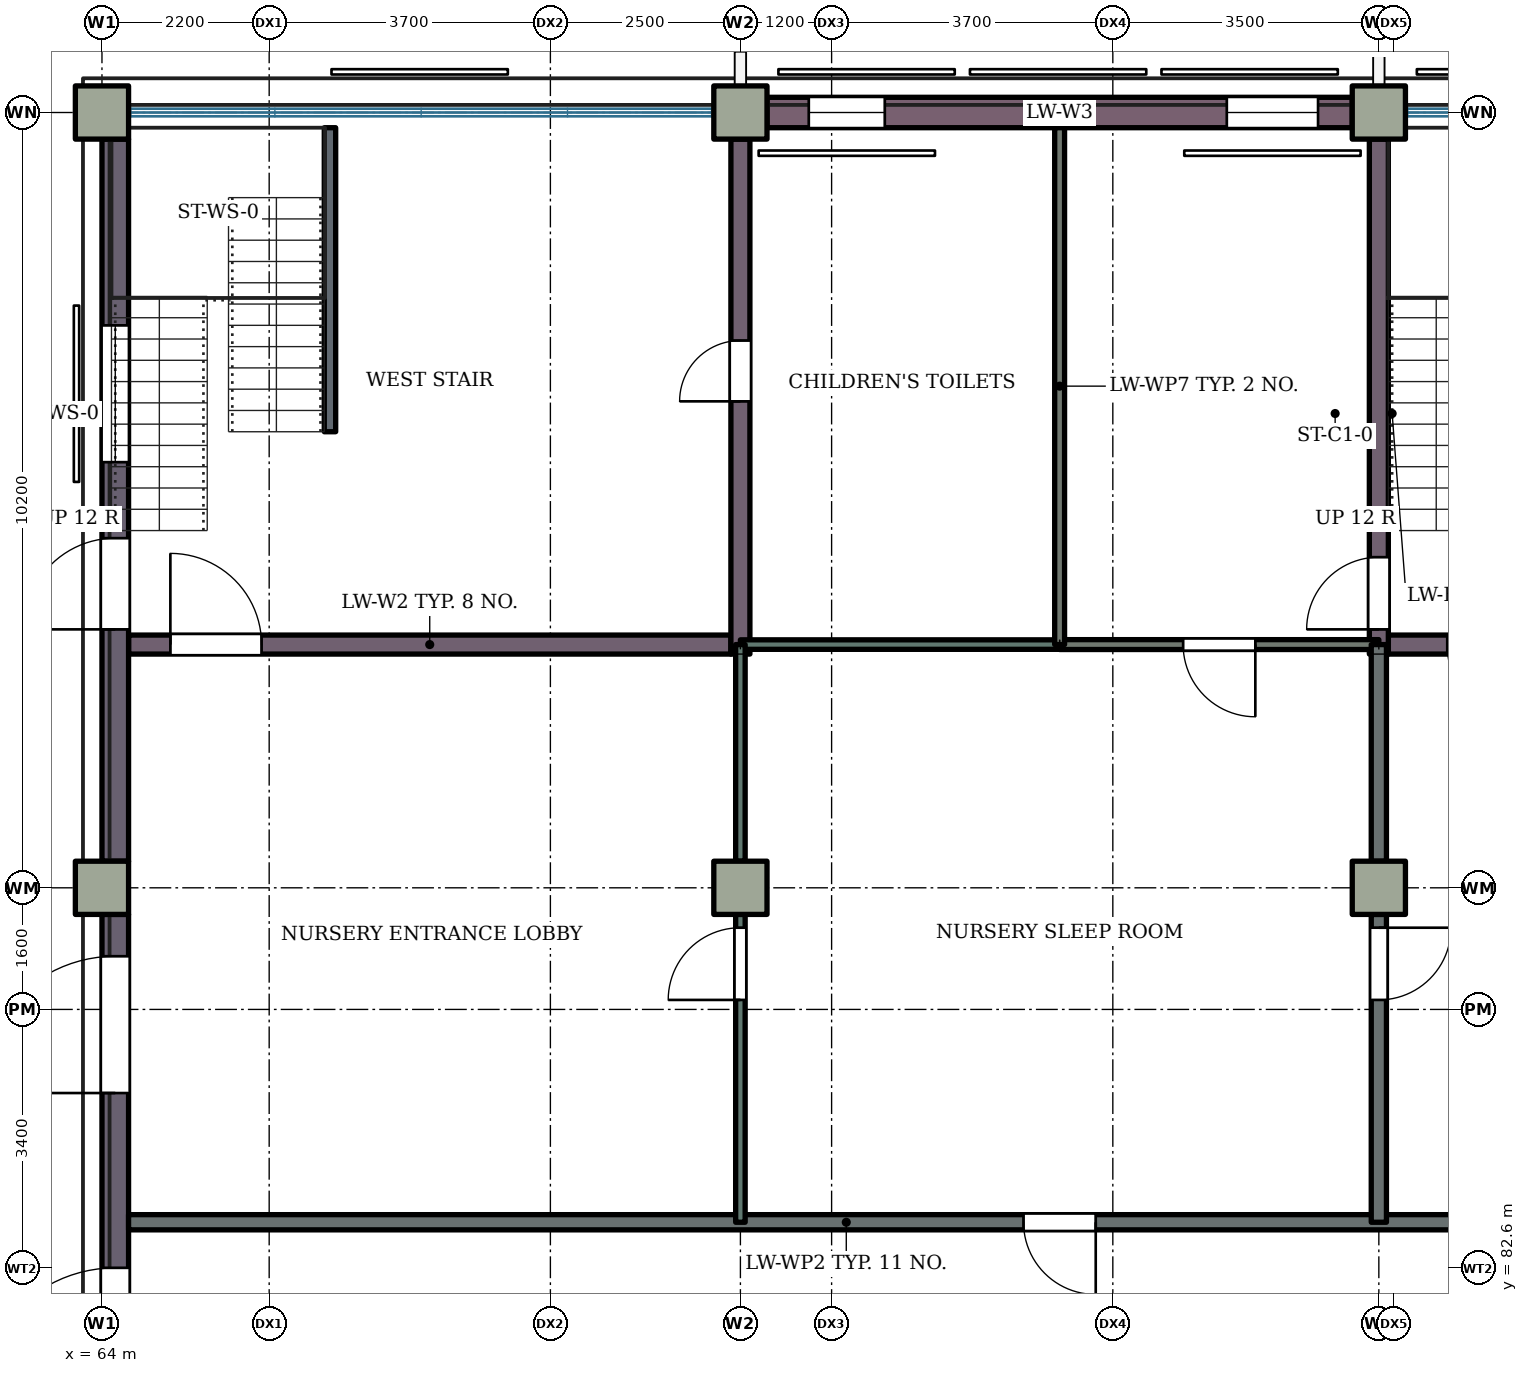
"""IFC4 building model, lengths in metres.
Left out: names, types, materials, properties, quantities, classifications, styles, units other than length and angle.
Written with IfcOpenShell. Run it as: python <this file> out.ifc"""

import sys

from ifc_helpers import new_model, si_unit, direction, frame, frame_2d, origin, origin_2d, place, context, subcontext, project, spatial, rectangle, extrude, element, fill, save


model = new_model("IFC4")
c1 = context("Model", 3, precision=1e-05, world=origin(), true_north=direction((0.0, 1.0)))
c2 = subcontext(c1, "Body", "Model", "MODEL_VIEW")
j1 = project(units=[si_unit("LENGTHUNIT", "METRE"), si_unit("PLANEANGLEUNIT", "RADIAN")], contexts=[c1])
p1 = place(None, origin())
s1 = spatial("IfcSite", under=j1, at=p1, CompositionType="ELEMENT")
p2 = place(p1, origin())
s2 = spatial("IfcBuilding", under=s1, at=p2, CompositionType="ELEMENT")
p3 = place(p2, origin())
s3 = spatial("IfcBuildingStorey", under=s2, at=p3, CompositionType="ELEMENT", Elevation=0.0)
for number, where, z_axis, x_axis in (
    (1, (64.0, 87.6, 0.0), (0.0, 0.0, 1.0), (1.0, 0.0, 0.0)),
    (2, (72.4, 87.6, 0.0), (0.0, 0.0, 1.0), (1.0, 0.0, 0.0)),
    (3, (80.8, 87.6, 0.0), (0.0, 0.0, 1.0), (1.0, 0.0, 0.0)),
    (4, (64.0, 97.8, 0.0), (0.0, 0.0, 1.0), (1.0, 0.0, 0.0)),
    (5, (72.4, 97.8, 0.0), (0.0, 0.0, 1.0), (1.0, 0.0, 0.0)),
    (6, (80.8, 97.8, 0.0), (0.0, 0.0, 1.0), (1.0, 0.0, 0.0)),
):
    element("IfcColumn", number, at=place(p3, frame(where, z_axis=z_axis, x_axis=x_axis)), inside=s3, PredefinedType="COLUMN", context=c2, shape_type="SweptSolid", body=[
        extrude(rectangle(XDim=0.7, YDim=0.7, at=origin_2d()), origin(), (0.0, 0.0, 1.0), 4.2),
    ])
p4 = place(p3, frame((64.35, 90.8, 0.0), z_axis=(0.0, 0.0, 1.0), x_axis=(1.0, 0.0, 0.0)))
e7 = element("IfcWall", 7, at=p4, inside=s3, PredefinedType="SHEAR", context=c2, shape_type="SweptSolid", body=[
    extrude(rectangle(XDim=7.925, YDim=0.25, at=frame_2d((3.962, 0.0))), origin(), (0.0, 0.0, 1.0), 4.2),
])
p5 = place(p4, frame((0.55, 0.0, 0.0)))
e8 = element("IfcOpeningElement", 8, at=p5, cuts=e7, PredefinedType="OPENING", context=c2, shape_type="SweptSolid", body=[
    extrude(rectangle(XDim=1.2, YDim=2.1, at=frame_2d((0.6, 1.05))), frame((0.0, 0.135, 0.0), z_axis=(0.0, -1.0, 0.0), x_axis=(1.0, 0.0, 0.0)), (0.0, 0.0, 1.0), 0.27),
])
p6 = place(p3, frame((80.925, 90.8, 0.0), z_axis=(0.0, 0.0, 1.0), x_axis=(1.0, 0.0, 0.0)))
e9 = element("IfcWall", 9, at=p6, inside=s3, PredefinedType="SHEAR", context=c2, shape_type="SweptSolid", body=[
    extrude(rectangle(XDim=5.45, YDim=0.25, at=frame_2d((2.725, 0.0))), origin(), (0.0, 0.0, 1.0), 4.2),
])
p7 = place(p6, frame((0.775, 0.0, 0.0)))
e10 = element("IfcOpeningElement", 10, at=p7, cuts=e9, PredefinedType="OPENING", context=c2, shape_type="SweptSolid", body=[
    extrude(rectangle(XDim=1.2, YDim=2.1, at=frame_2d((0.6, 1.05))), frame((0.0, 0.135, 0.0), z_axis=(0.0, -1.0, 0.0), x_axis=(1.0, 0.0, 0.0)), (0.0, 0.0, 1.0), 0.27),
])
p8 = place(p3, frame((64.175, 78.75, 0.0), z_axis=(0.0, 0.0, 1.0), x_axis=(0.0, 1.0, 0.0)))
e11 = element("IfcWall", 11, at=p8, inside=s3, PredefinedType="SHEAR", context=c2, shape_type="SweptSolid", body=[
    extrude(rectangle(XDim=8.5, YDim=0.35, at=frame_2d((4.25, 0.0))), origin(), (0.0, 0.0, 1.0), 4.2),
])
p9 = place(p8, frame((2.05, 0.0, 0.0)))
e12 = element("IfcOpeningElement", 12, at=p9, cuts=e11, PredefinedType="OPENING", context=c2, shape_type="SweptSolid", body=[
    extrude(rectangle(XDim=1.8, YDim=2.1, at=frame_2d((0.9, 1.05))), frame((0.0, 0.185, 0.0), z_axis=(0.0, -1.0, 0.0), x_axis=(1.0, 0.0, 0.0)), (0.0, 0.0, 1.0), 0.37),
])
p10 = place(p8, frame((6.15, 0.0, 0.0)))
e13 = element("IfcOpeningElement", 13, at=p10, cuts=e11, PredefinedType="OPENING", context=c2, shape_type="SweptSolid", body=[
    extrude(rectangle(XDim=1.8, YDim=2.1, at=frame_2d((0.9, 1.05))), frame((0.0, 0.185, 0.0), z_axis=(0.0, -1.0, 0.0), x_axis=(1.0, 0.0, 0.0)), (0.0, 0.0, 1.0), 0.37),
])
p11 = place(p3, frame((64.175, 87.95, 0.0), z_axis=(0.0, 0.0, 1.0), x_axis=(0.0, 1.0, 0.0)))
e14 = element("IfcWall", 14, at=p11, inside=s3, PredefinedType="SHEAR", context=c2, shape_type="SweptSolid", body=[
    extrude(rectangle(XDim=9.5, YDim=0.35, at=frame_2d((4.75, 0.0))), origin(), (0.0, 0.0, 1.0), 4.2),
])
p12 = place(p11, frame((3.05, 0.0, 0.0)))
e15 = element("IfcOpeningElement", 15, at=p12, cuts=e14, PredefinedType="OPENING", context=c2, shape_type="SweptSolid", body=[
    extrude(rectangle(XDim=1.2, YDim=2.1, at=frame_2d((0.6, 1.05))), frame((0.0, 0.185, 0.0), z_axis=(0.0, -1.0, 0.0), x_axis=(1.0, 0.0, 0.0)), (0.0, 0.0, 1.0), 0.37),
])
p13 = place(p11, frame((5.25, 0.0, 0.9)))
e16 = element("IfcOpeningElement", 16, at=p13, cuts=e14, PredefinedType="OPENING", context=c2, shape_type="SweptSolid", body=[
    extrude(rectangle(XDim=1.8, YDim=2.1, at=frame_2d((0.9, 1.05))), frame((0.0, 0.185, 0.0), z_axis=(0.0, -1.0, 0.0), x_axis=(1.0, 0.0, 0.0)), (0.0, 0.0, 1.0), 0.37),
])
p14 = place(p3, frame((72.4, 90.675, 0.0), z_axis=(0.0, 0.0, 1.0), x_axis=(0.0, 1.0, 0.0)))
e17 = element("IfcWall", 17, at=p14, inside=s3, PredefinedType="SHEAR", context=c2, shape_type="SweptSolid", body=[
    extrude(rectangle(XDim=6.775, YDim=0.25, at=frame_2d((3.387, 0.0))), origin(), (0.0, 0.0, 1.0), 4.2),
])
p15 = place(p14, frame((3.325, 0.0, 0.0)))
e18 = element("IfcOpeningElement", 18, at=p15, cuts=e17, PredefinedType="OPENING", context=c2, shape_type="SweptSolid", body=[
    extrude(rectangle(XDim=0.8, YDim=2.1, at=frame_2d((0.4, 1.05))), frame((0.0, 0.135, 0.0), z_axis=(0.0, -1.0, 0.0), x_axis=(1.0, 0.0, 0.0)), (0.0, 0.0, 1.0), 0.27),
])
p16 = place(p3, frame((80.8, 90.675, 0.0), z_axis=(0.0, 0.0, 1.0), x_axis=(0.0, 1.0, 0.0)))
e19 = element("IfcWall", 19, at=p16, inside=s3, PredefinedType="SHEAR", context=c2, shape_type="SweptSolid", body=[
    extrude(rectangle(XDim=6.775, YDim=0.25, at=frame_2d((3.387, 0.0))), origin(), (0.0, 0.0, 1.0), 4.2),
])
p17 = place(p16, frame((0.325, 0.0, 0.0)))
e20 = element("IfcOpeningElement", 20, at=p17, cuts=e19, PredefinedType="OPENING", context=c2, shape_type="SweptSolid", body=[
    extrude(rectangle(XDim=0.95, YDim=2.1, at=frame_2d((0.475, 1.05))), frame((0.0, 0.135, 0.0), z_axis=(0.0, -1.0, 0.0), x_axis=(1.0, 0.0, 0.0)), (0.0, 0.0, 1.0), 0.27),
])
p18 = place(p3, frame((72.75, 97.8, 0.0), z_axis=(0.0, 0.0, 1.0), x_axis=(1.0, 0.0, 0.0)))
e21 = element("IfcWall", 21, at=p18, inside=s3, PredefinedType="SOLIDWALL", context=c2, shape_type="SweptSolid", body=[
    extrude(rectangle(XDim=7.7, YDim=0.4, at=frame_2d((3.85, 0.0))), origin(), (0.0, 0.0, 1.0), 3.32),
])
p19 = place(p18, frame((0.55, 0.0, 1.8)))
e22 = element("IfcOpeningElement", 22, at=p19, cuts=e21, PredefinedType="OPENING", context=c2, shape_type="SweptSolid", body=[
    extrude(rectangle(XDim=1.0, YDim=1.2, at=frame_2d((0.5, 0.6))), frame((0.0, 0.21, 0.0), z_axis=(0.0, -1.0, 0.0), x_axis=(1.0, 0.0, 0.0)), (0.0, 0.0, 1.0), 0.42),
])
p20 = place(p18, frame((6.05, 0.0, 1.5)))
e23 = element("IfcOpeningElement", 23, at=p20, cuts=e21, PredefinedType="OPENING", context=c2, shape_type="SweptSolid", body=[
    extrude(rectangle(XDim=1.2, YDim=1.5, at=frame_2d((0.6, 0.75))), frame((0.0, 0.21, 0.0), z_axis=(0.0, -1.0, 0.0), x_axis=(1.0, 0.0, 0.0)), (0.0, 0.0, 1.0), 0.42),
])
p21 = place(p3, frame((64.35, 83.2, 0.0), z_axis=(0.0, 0.0, 1.0), x_axis=(1.0, 0.0, 0.0)))
e24 = element("IfcWall", 24, at=p21, inside=s3, PredefinedType="PARTITIONING", context=c2, shape_type="SweptSolid", body=[
    extrude(rectangle(XDim=24.85, YDim=0.2, at=frame_2d((12.425, 0.0))), origin(), (0.0, 0.0, 1.0), 3.92),
])
p22 = place(p21, frame((11.775, 0.0, 0.0)))
e25 = element("IfcOpeningElement", 25, at=p22, cuts=e24, PredefinedType="OPENING", context=c2, shape_type="SweptSolid", body=[
    extrude(rectangle(XDim=0.95, YDim=2.1, at=frame_2d((0.475, 1.05))), frame((0.0, 0.11, 0.0), z_axis=(0.0, -1.0, 0.0), x_axis=(1.0, 0.0, 0.0)), (0.0, 0.0, 1.0), 0.22),
])
p23 = place(p21, frame((19.75, 0.0, 0.0)))
e26 = element("IfcOpeningElement", 26, at=p23, cuts=e24, PredefinedType="OPENING", context=c2, shape_type="SweptSolid", body=[
    extrude(rectangle(XDim=1.8, YDim=2.1, at=frame_2d((0.9, 1.05))), frame((0.0, 0.11, 0.0), z_axis=(0.0, -1.0, 0.0), x_axis=(1.0, 0.0, 0.0)), (0.0, 0.0, 1.0), 0.22),
])
p24 = place(p3, frame((76.6, 90.8, 0.0), z_axis=(0.0, 0.0, 1.0), x_axis=(1.0, 0.0, 0.0)))
e27 = element("IfcWall", 27, at=p24, inside=s3, PredefinedType="PARTITIONING", context=c2, shape_type="SweptSolid", body=[
    extrude(rectangle(XDim=4.2, YDim=0.13, at=frame_2d((2.1, 0.0))), origin(), (0.0, 0.0, 1.0), 3.92),
])
p25 = place(p24, frame((1.625, 0.0, 0.0)))
e28 = element("IfcOpeningElement", 28, at=p25, cuts=e27, PredefinedType="OPENING", context=c2, shape_type="SweptSolid", body=[
    extrude(rectangle(XDim=0.95, YDim=2.1, at=frame_2d((0.475, 1.05))), frame((0.0, 0.075, 0.0), z_axis=(0.0, -1.0, 0.0), x_axis=(1.0, 0.0, 0.0)), (0.0, 0.0, 1.0), 0.15),
])
p26 = place(p3, frame((72.4, 90.8, 0.0), z_axis=(0.0, 0.0, 1.0), x_axis=(1.0, 0.0, 0.0)))
e29 = element("IfcWall", 29, at=p26, inside=s3, PredefinedType="PARTITIONING", context=c2, shape_type="SweptSolid", body=[
    extrude(rectangle(XDim=4.2, YDim=0.125, at=frame_2d((2.1, 0.0))), origin(), (0.0, 0.0, 1.0), 3.92),
])
p27 = place(p3, frame((72.4, 83.2, 0.0), z_axis=(0.0, 0.0, 1.0), x_axis=(0.0, 1.0, 0.0)))
e30 = element("IfcWall", 30, at=p27, inside=s3, PredefinedType="PARTITIONING", context=c2, shape_type="SweptSolid", body=[
    extrude(rectangle(XDim=4.05, YDim=0.125, at=frame_2d((2.025, 0.0))), origin(), (0.0, 0.0, 1.0), 3.02),
])
p28 = place(p27, frame((2.925, 0.0, 0.0)))
e31 = element("IfcOpeningElement", 31, at=p28, cuts=e30, PredefinedType="OPENING", context=c2, shape_type="SweptSolid", body=[
    extrude(rectangle(XDim=0.95, YDim=2.1, at=frame_2d((0.475, 1.05))), frame((0.0, 0.073, 0.0), z_axis=(0.0, -1.0, 0.0), x_axis=(1.0, 0.0, 0.0)), (0.0, 0.0, 1.0), 0.145),
])
p29 = place(p3, frame((72.4, 87.95, 0.0), z_axis=(0.0, 0.0, 1.0), x_axis=(0.0, 1.0, 0.0)))
e32 = element("IfcWall", 32, at=p29, inside=s3, PredefinedType="PARTITIONING", context=c2, shape_type="SweptSolid", body=[
    extrude(rectangle(XDim=2.85, YDim=0.125, at=frame_2d((1.425, 0.0))), origin(), (0.0, 0.0, 1.0), 3.02),
])
p30 = place(p3, frame((76.6, 90.8, 0.0), z_axis=(0.0, 0.0, 1.0), x_axis=(0.0, 1.0, 0.0)))
e33 = element("IfcWall", 33, at=p30, inside=s3, PredefinedType="PARTITIONING", context=c2, shape_type="SweptSolid", body=[
    extrude(rectangle(XDim=6.8, YDim=0.13, at=frame_2d((3.4, 0.0))), origin(), (0.0, 0.0, 1.0), 3.92),
])
p31 = place(p3, frame((80.8, 83.2, 0.0), z_axis=(0.0, 0.0, 1.0), x_axis=(0.0, 1.0, 0.0)))
e34 = element("IfcWall", 34, at=p31, inside=s3, PredefinedType="PARTITIONING", context=c2, shape_type="SweptSolid", body=[
    extrude(rectangle(XDim=4.05, YDim=0.2, at=frame_2d((2.025, 0.0))), origin(), (0.0, 0.0, 1.0), 3.02),
])
p32 = place(p31, frame((2.925, 0.0, 0.0)))
e35 = element("IfcOpeningElement", 35, at=p32, cuts=e34, PredefinedType="OPENING", context=c2, shape_type="SweptSolid", body=[
    extrude(rectangle(XDim=0.95, YDim=2.1, at=frame_2d((0.475, 1.05))), frame((0.0, 0.11, 0.0), z_axis=(0.0, -1.0, 0.0), x_axis=(1.0, 0.0, 0.0)), (0.0, 0.0, 1.0), 0.22),
])
p33 = place(p3, frame((80.8, 87.95, 0.0), z_axis=(0.0, 0.0, 1.0), x_axis=(0.0, 1.0, 0.0)))
e36 = element("IfcWall", 36, at=p33, inside=s3, PredefinedType="PARTITIONING", context=c2, shape_type="SweptSolid", body=[
    extrude(rectangle(XDim=2.85, YDim=0.2, at=frame_2d((1.425, 0.0))), origin(), (0.0, 0.0, 1.0), 3.02),
])
p34 = place(p3, frame((67.0, 93.6, 0.0), z_axis=(0.0, 0.0, 1.0), x_axis=(0.0, 1.0, 0.0)))
e37 = element("IfcWall", 37, at=p34, inside=s3, PredefinedType="PARTITIONING", context=c2, shape_type="SweptSolid", body=[
    extrude(rectangle(XDim=4.0, YDim=0.15, at=frame_2d((2.0, 0.0))), origin(), (0.0, 0.0, 1.0), 3.92),
])
p35 = place(p19, origin())
e38 = element("IfcWindow", 38, at=p35, inside=s3, PartitioningType="SINGLE_PANEL", PredefinedType="WINDOW", context=c2, shape_type="SweptSolid", body=[
    extrude(rectangle(XDim=1.0, YDim=1.2, at=frame_2d((0.5, 0.6))), frame((0.0, 0.03, 0.0), z_axis=(0.0, -1.0, 0.0), x_axis=(1.0, 0.0, 0.0)), (0.0, 0.0, 1.0), 0.06),
])
fill(e22, e38)
p36 = place(p20, origin())
e39 = element("IfcWindow", 39, at=p36, inside=s3, PartitioningType="SINGLE_PANEL", PredefinedType="WINDOW", context=c2, shape_type="SweptSolid", body=[
    extrude(rectangle(XDim=1.2, YDim=1.5, at=frame_2d((0.6, 0.75))), frame((0.0, 0.03, 0.0), z_axis=(0.0, -1.0, 0.0), x_axis=(1.0, 0.0, 0.0)), (0.0, 0.0, 1.0), 0.06),
])
fill(e23, e39)
p37 = place(p9, origin())
e40 = element("IfcDoor", 40, at=p37, inside=s3, OperationType="DOUBLE_DOOR_SINGLE_SWING", PredefinedType="DOOR", context=c2, shape_type="SweptSolid", body=[
    extrude(rectangle(XDim=1.8, YDim=2.1, at=frame_2d((0.9, 1.05))), frame((0.0, 0.025, 0.0), z_axis=(0.0, -1.0, 0.0), x_axis=(1.0, 0.0, 0.0)), (0.0, 0.0, 1.0), 0.05),
])
fill(e12, e40)
p38 = place(p10, origin())
e41 = element("IfcDoor", 41, at=p38, inside=s3, OperationType="DOUBLE_DOOR_SINGLE_SWING", PredefinedType="DOOR", context=c2, shape_type="SweptSolid", body=[
    extrude(rectangle(XDim=1.8, YDim=2.1, at=frame_2d((0.9, 1.05))), frame((0.0, 0.025, 0.0), z_axis=(0.0, -1.0, 0.0), x_axis=(1.0, 0.0, 0.0)), (0.0, 0.0, 1.0), 0.05),
])
fill(e13, e41)
p39 = place(p12, origin())
e42 = element("IfcDoor", 42, at=p39, inside=s3, OperationType="SINGLE_SWING_LEFT", PredefinedType="DOOR", context=c2, shape_type="SweptSolid", body=[
    extrude(rectangle(XDim=1.2, YDim=2.1, at=frame_2d((0.6, 1.05))), frame((0.0, 0.025, 0.0), z_axis=(0.0, -1.0, 0.0), x_axis=(1.0, 0.0, 0.0)), (0.0, 0.0, 1.0), 0.05),
])
fill(e15, e42)
p40 = place(p13, origin())
e43 = element("IfcWindow", 43, at=p40, inside=s3, PartitioningType="SINGLE_PANEL", PredefinedType="WINDOW", context=c2, shape_type="SweptSolid", body=[
    extrude(rectangle(XDim=1.8, YDim=2.1, at=frame_2d((0.9, 1.05))), frame((0.0, 0.03, 0.0), z_axis=(0.0, -1.0, 0.0), x_axis=(1.0, 0.0, 0.0)), (0.0, 0.0, 1.0), 0.06),
])
fill(e16, e43)
p41 = place(p22, origin())
e44 = element("IfcDoor", 44, at=p41, inside=s3, OperationType="SINGLE_SWING_RIGHT", PredefinedType="DOOR", context=c2, shape_type="SweptSolid", body=[
    extrude(rectangle(XDim=0.95, YDim=2.1, at=frame_2d((0.475, 1.05))), frame((0.0, 0.025, 0.0), z_axis=(0.0, -1.0, 0.0), x_axis=(1.0, 0.0, 0.0)), (0.0, 0.0, 1.0), 0.05),
])
fill(e25, e44)
p42 = place(p28, origin())
e45 = element("IfcDoor", 45, at=p42, inside=s3, OperationType="SINGLE_SWING_LEFT", PredefinedType="DOOR", context=c2, shape_type="SweptSolid", body=[
    extrude(rectangle(XDim=0.95, YDim=2.1, at=frame_2d((0.475, 1.05))), frame((0.0, 0.025, 0.0), z_axis=(0.0, -1.0, 0.0), x_axis=(1.0, 0.0, 0.0)), (0.0, 0.0, 1.0), 0.05),
])
fill(e31, e45)
p43 = place(p32, origin())
e46 = element("IfcDoor", 46, at=p43, inside=s3, OperationType="SINGLE_SWING_RIGHT", PredefinedType="DOOR", context=c2, shape_type="SweptSolid", body=[
    extrude(rectangle(XDim=0.95, YDim=2.1, at=frame_2d((0.475, 1.05))), frame((0.0, 0.025, 0.0), z_axis=(0.0, -1.0, 0.0), x_axis=(1.0, 0.0, 0.0)), (0.0, 0.0, 1.0), 0.05),
])
fill(e35, e46)
p44 = place(p15, origin())
e47 = element("IfcDoor", 47, at=p44, inside=s3, OperationType="SINGLE_SWING_LEFT", PredefinedType="DOOR", context=c2, shape_type="SweptSolid", body=[
    extrude(rectangle(XDim=0.8, YDim=2.1, at=frame_2d((0.4, 1.05))), frame((0.0, 0.025, 0.0), z_axis=(0.0, -1.0, 0.0), x_axis=(1.0, 0.0, 0.0)), (0.0, 0.0, 1.0), 0.05),
])
fill(e18, e47)
p45 = place(p25, origin())
e48 = element("IfcDoor", 48, at=p45, inside=s3, OperationType="SINGLE_SWING_RIGHT", PredefinedType="DOOR", context=c2, shape_type="SweptSolid", body=[
    extrude(rectangle(XDim=0.95, YDim=2.1, at=frame_2d((0.475, 1.05))), frame((0.0, 0.025, 0.0), z_axis=(0.0, -1.0, 0.0), x_axis=(1.0, 0.0, 0.0)), (0.0, 0.0, 1.0), 0.05),
])
fill(e28, e48)
p46 = place(p17, origin())
e49 = element("IfcDoor", 49, at=p46, inside=s3, OperationType="SINGLE_SWING_LEFT", PredefinedType="DOOR", context=c2, shape_type="SweptSolid", body=[
    extrude(rectangle(XDim=0.95, YDim=2.1, at=frame_2d((0.475, 1.05))), frame((0.0, 0.025, 0.0), z_axis=(0.0, -1.0, 0.0), x_axis=(1.0, 0.0, 0.0)), (0.0, 0.0, 1.0), 0.05),
])
fill(e20, e49)
p47 = place(p5, origin())
e50 = element("IfcDoor", 50, at=p47, inside=s3, OperationType="SINGLE_SWING_LEFT", PredefinedType="DOOR", context=c2, shape_type="SweptSolid", body=[
    extrude(rectangle(XDim=1.2, YDim=2.1, at=frame_2d((0.6, 1.05))), frame((0.0, 0.025, 0.0), z_axis=(0.0, -1.0, 0.0), x_axis=(1.0, 0.0, 0.0)), (0.0, 0.0, 1.0), 0.05),
])
fill(e8, e50)
p48 = place(p7, origin())
e51 = element("IfcDoor", 51, at=p48, inside=s3, OperationType="SINGLE_SWING_RIGHT", PredefinedType="DOOR", context=c2, shape_type="SweptSolid", body=[
    extrude(rectangle(XDim=1.2, YDim=2.1, at=frame_2d((0.6, 1.05))), frame((0.0, 0.025, 0.0), z_axis=(0.0, -1.0, 0.0), x_axis=(1.0, 0.0, 0.0)), (0.0, 0.0, 1.0), 0.05),
])
fill(e10, e51)
save(model, sys.argv[1])
